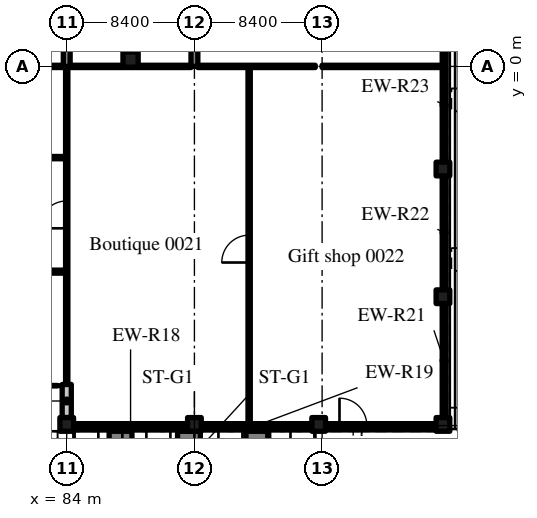
"""IFC4 building model, lengths in metres.
Left out: names, types, materials, properties, quantities, classifications, styles, units other than length and angle.
Written with IfcOpenShell. Run it as: python <this file> out.ifc"""

import sys

from ifc_helpers import new_model, si_unit, direction, frame, frame_2d, origin, origin_2d, place, context, subcontext, project, spatial, rectangle, extrude, source, transform, mapped, element, fill, save


model = new_model("IFC4")
c1 = context("Model", 3, precision=1e-05, world=origin(), true_north=direction((0.0, 1.0)))
c2 = subcontext(c1, "Body", "Model", "MODEL_VIEW")
j1 = project(units=[si_unit("LENGTHUNIT", "METRE"), si_unit("PLANEANGLEUNIT", "RADIAN")], contexts=[c1])
p1 = place(None, origin())
s1 = spatial("IfcSite", under=j1, at=p1, CompositionType="ELEMENT")
p2 = place(p1, origin())
s2 = spatial("IfcBuilding", under=s1, at=p2, CompositionType="ELEMENT")
p3 = place(p2, origin())
s3 = spatial("IfcBuildingStorey", under=s2, at=p3, CompositionType="ELEMENT", Elevation=0.0)
m1 = source(origin(), c2, "Body", "SweptSolid", [
    extrude(rectangle(XDim=19.6, YDim=0.45, at=frame_2d((9.8, 0.0))), origin(), (0.0, 0.0, 1.0), 5.72),
])
for number, where, z_axis, x_axis in (
    (1, (84.0, 0.0, 0.0), (0.0, 0.0, 1.0), (0.0, 1.0, 0.0)),
    (2, (92.4, 0.0, 0.0), (0.0, 0.0, 1.0), (0.0, 1.0, 0.0)),
):
    element("IfcWall", number, at=place(p3, frame(where, z_axis=z_axis, x_axis=x_axis)), inside=s3, PredefinedType="SHEAR", context=c2, shape_type="MappedRepresentation", body=[
        mapped(m1, transform((0.0, 0.0, 0.0), scale=1.0)),
    ])
m2 = source(origin(), c2, "Body", "SweptSolid", [
    extrude(rectangle(XDim=1.0, YDim=1.0, at=origin_2d()), origin(), (0.0, 0.0, 1.0), 5.72),
])
p4 = place(p3, frame((88.2, 0.45, 0.0), z_axis=(0.0, 0.0, 1.0), x_axis=(1.0, 0.0, 0.0)))
e3 = element("IfcColumn", 3, at=p4, inside=s3, PredefinedType="COLUMN", context=c2, shape_type="MappedRepresentation", body=[
    mapped(m2, transform((0.0, 0.0, 0.0), scale=1.0)),
])
m3 = source(origin(), c2, "Body", "SweptSolid", [
    extrude(rectangle(XDim=0.9, YDim=0.9, at=origin_2d()), origin(), (0.0, 0.0, 1.0), 5.72),
])
for number, where, z_axis, x_axis in (
    (4, (108.75, -23.55, 0.0), (0.0, 0.0, 1.0), (1.0, 0.0, 0.0)),
    (5, (108.75, -15.15, 0.0), (0.0, 0.0, 1.0), (1.0, 0.0, 0.0)),
    (6, (108.75, -6.75, 0.0), (0.0, 0.0, 1.0), (1.0, 0.0, 0.0)),
    (7, (84.0, -23.55, 0.0), (0.0, 0.0, 1.0), (1.0, 0.0, 0.0)),
    (8, (92.4, -23.55, 0.0), (0.0, 0.0, 1.0), (1.0, 0.0, 0.0)),
    (9, (100.575, -23.55, 0.0), (0.0, 0.0, 1.0), (1.0, 0.0, 0.0)),
):
    element("IfcColumn", number, at=place(p3, frame(where, z_axis=z_axis, x_axis=x_axis)), inside=s3, PredefinedType="COLUMN", context=c2, shape_type="MappedRepresentation", body=[
        mapped(m3, transform((0.0, 0.0, 0.0), scale=1.0)),
    ])
m4 = source(origin(), c2, "Body", "SweptSolid", [
    extrude(rectangle(XDim=7.5, YDim=0.25, at=frame_2d((3.75, 0.0))), origin(), (0.0, 0.0, 1.0), 4.65),
])
p5 = place(p3, frame((84.45, -23.625, 0.0), z_axis=(0.0, 0.0, 1.0), x_axis=(1.0, 0.0, 0.0)))
e10 = element("IfcWall", 10, at=p5, inside=s3, PredefinedType="SOLIDWALL", context=c2, shape_type="MappedRepresentation", body=[
    mapped(m4, transform((0.0, 0.0, 0.0), scale=1.0)),
])
m5 = source(origin(), c2, "Body", "SweptSolid", [
    extrude(rectangle(XDim=7.275, YDim=0.25, at=frame_2d((3.637, 0.0))), origin(), (0.0, 0.0, 1.0), 4.65),
])
p6 = place(p3, frame((92.85, -23.625, 0.0), z_axis=(0.0, 0.0, 1.0), x_axis=(1.0, 0.0, 0.0)))
e11 = element("IfcWall", 11, at=p6, inside=s3, PredefinedType="SOLIDWALL", context=c2, shape_type="MappedRepresentation", body=[
    mapped(m5, transform((0.0, 0.0, 0.0), scale=1.0)),
])
m6 = source(origin(), c2, "Body", "SweptSolid", [
    extrude(rectangle(XDim=7.275, YDim=0.25, at=frame_2d((3.638, 0.0))), origin(), (0.0, 0.0, 1.0), 4.65),
])
p7 = place(p3, frame((101.025, -23.625, 0.0), z_axis=(0.0, 0.0, 1.0), x_axis=(1.0, 0.0, 0.0)))
e12 = element("IfcWall", 12, at=p7, inside=s3, PredefinedType="SOLIDWALL", context=c2, shape_type="MappedRepresentation", body=[
    mapped(m6, transform((0.0, 0.0, 0.0), scale=1.0)),
])
m7 = source(origin(), c2, "Body", "SweptSolid", [
    extrude(rectangle(XDim=1.8, YDim=2.4, at=frame_2d((0.9, 1.2))), frame((0.0, 0.135, 0.0), z_axis=(0.0, -1.0, 0.0), x_axis=(1.0, 0.0, 0.0)), (0.0, 0.0, 1.0), 0.27),
])
p8 = place(p7, frame((0.919, 0.0, 0.0)))
e13 = element("IfcOpeningElement", 13, at=p8, cuts=e12, PredefinedType="OPENING", context=c2, shape_type="MappedRepresentation", body=[
    mapped(m7, transform((0.0, 0.0, 0.0), scale=1.0)),
])
m8 = source(origin(), c2, "Body", "SweptSolid", [
    extrude(rectangle(XDim=2.4, YDim=3.0, at=frame_2d((1.2, 1.5))), frame((0.0, 0.135, 0.0), z_axis=(0.0, -1.0, 0.0), x_axis=(1.0, 0.0, 0.0)), (0.0, 0.0, 1.0), 0.27),
])
p9 = place(p7, frame((4.256, 0.0, 0.2)))
e14 = element("IfcOpeningElement", 14, at=p9, cuts=e12, PredefinedType="OPENING", context=c2, shape_type="MappedRepresentation", body=[
    mapped(m8, transform((0.0, 0.0, 0.0), scale=1.0)),
])
m9 = source(origin(), c2, "Body", "SweptSolid", [
    extrude(rectangle(XDim=7.5, YDim=0.25, at=frame_2d((3.75, 0.0))), origin(), (0.0, 0.0, 1.0), 4.72),
])
for number, where, z_axis, x_axis in (
    (15, (108.825, -23.1, 0.0), (0.0, 0.0, 1.0), (0.0, 1.0, 0.0)),
    (16, (108.825, -14.7, 0.0), (0.0, 0.0, 1.0), (0.0, 1.0, 0.0)),
    (17, (108.825, -6.3, 0.0), (0.0, 0.0, 1.0), (0.0, 1.0, 0.0)),
):
    element("IfcWall", number, at=place(p3, frame(where, z_axis=z_axis, x_axis=x_axis)), inside=s3, PredefinedType="SOLIDWALL", context=c2, shape_type="MappedRepresentation", body=[
        mapped(m9, transform((0.0, 0.0, 0.0), scale=1.0)),
    ])
m10 = source(origin(), c2, "Body", "SweptSolid", [
    extrude(rectangle(XDim=2.18, YDim=0.6, at=frame_2d((1.09, 0.0))), origin(), (0.0, 0.0, 1.0), 4.05),
])
p10 = place(p3, frame((84.0, -23.1, 0.0), z_axis=(0.0, 0.0, 1.0), x_axis=(0.0, 1.0, 0.0)))
e18 = element("IfcWall", 18, at=p10, inside=s3, PredefinedType="SOLIDWALL", context=c2, shape_type="MappedRepresentation", body=[
    mapped(m10, transform((0.0, 0.0, 0.0), scale=1.0)),
])
m11 = source(origin(), c2, "Body", "SweptSolid", [
    extrude(rectangle(XDim=1.5, YDim=0.75, at=frame_2d((0.75, 0.0))), origin(), (0.0, 0.0, 1.0), 5.8),
])
for number, where, z_axis, x_axis in (
    (19, (86.79, -24.375, 0.0), (0.0, 0.0, 1.0), (1.0, 0.0, 0.0)),
    (20, (91.29, -24.375, 0.0), (0.0, 0.0, 1.0), (1.0, 0.0, 0.0)),
    (21, (95.79, -24.375, 0.0), (0.0, 0.0, 1.0), (1.0, 0.0, 0.0)),
):
    element("IfcWall", number, at=place(p3, frame(where, z_axis=z_axis, x_axis=x_axis)), inside=s3, PredefinedType="SOLIDWALL", context=c2, shape_type="MappedRepresentation", body=[
        mapped(m11, transform((0.0, 0.0, 0.0), scale=1.0)),
    ])
m12 = source(origin(), c2, "Body", "SweptSolid", [
    extrude(rectangle(XDim=7.95, YDim=0.15, at=frame_2d((3.975, 0.0))), origin(), (0.0, 0.0, 1.0), 5.72),
])
for number, where, z_axis, x_axis in (
    (22, (75.825, 0.0, 0.0), (0.0, 0.0, 1.0), (1.0, 0.0, 0.0)),
    (23, (84.225, 0.0, 0.0), (0.0, 0.0, 1.0), (1.0, 0.0, 0.0)),
):
    element("IfcWall", number, at=place(p3, frame(where, z_axis=z_axis, x_axis=x_axis)), inside=s3, PredefinedType="PARTITIONING", context=c2, shape_type="MappedRepresentation", body=[
        mapped(m12, transform((0.0, 0.0, 0.0), scale=1.0)),
    ])
m13 = source(origin(), c2, "Body", "SweptSolid", [
    extrude(rectangle(XDim=7.725, YDim=0.15, at=frame_2d((3.863, 0.0))), origin(), (0.0, 0.0, 1.0), 5.72),
])
p11 = place(p3, frame((92.625, 0.0, 0.0), z_axis=(0.0, 0.0, 1.0), x_axis=(1.0, 0.0, 0.0)))
e24 = element("IfcWall", 24, at=p11, inside=s3, PredefinedType="PARTITIONING", context=c2, shape_type="MappedRepresentation", body=[
    mapped(m13, transform((0.0, 0.0, 0.0), scale=1.0)),
])
m14 = source(origin(), c2, "Body", "SweptSolid", [
    extrude(rectangle(XDim=20.845, YDim=0.15, at=frame_2d((10.422, 0.0))), origin(), (0.0, 0.0, 1.0), 4.12),
])
p12 = place(p3, frame((84.0, -20.92, 0.0), z_axis=(0.0, 0.0, 1.0), x_axis=(0.0, 1.0, 0.0)))
e25 = element("IfcWall", 25, at=p12, inside=s3, PredefinedType="PARTITIONING", context=c2, shape_type="MappedRepresentation", body=[
    mapped(m14, transform((0.0, 0.0, 0.0), scale=1.0)),
])
m15 = source(origin(), c2, "Body", "SweptSolid", [
    extrude(rectangle(XDim=1.8, YDim=2.1, at=frame_2d((0.9, 1.05))), frame((0.0, 0.085, 0.0), z_axis=(0.0, -1.0, 0.0), x_axis=(1.0, 0.0, 0.0)), (0.0, 0.0, 1.0), 0.17),
])
p13 = place(p12, frame((10.27, 0.0, 0.0)))
e26 = element("IfcOpeningElement", 26, at=p13, cuts=e25, PredefinedType="OPENING", context=c2, shape_type="MappedRepresentation", body=[
    mapped(m15, transform((0.0, 0.0, 0.0), scale=1.0)),
])
m16 = source(origin(), c2, "Body", "SweptSolid", [
    extrude(rectangle(XDim=23.425, YDim=0.15, at=frame_2d((11.712, 0.0))), origin(), (0.0, 0.0, 1.0), 5.72),
])
p14 = place(p3, frame((96.0, -23.5, 0.0), z_axis=(0.0, 0.0, 1.0), x_axis=(0.0, 1.0, 0.0)))
e27 = element("IfcWall", 27, at=p14, inside=s3, PredefinedType="PARTITIONING", context=c2, shape_type="MappedRepresentation", body=[
    mapped(m16, transform((0.0, 0.0, 0.0), scale=1.0)),
])
p15 = place(p14, frame((10.6, 0.0, 0.0)))
e28 = element("IfcOpeningElement", 28, at=p15, cuts=e27, PredefinedType="OPENING", context=c2, shape_type="MappedRepresentation", body=[
    mapped(m15, transform((0.0, 0.0, 0.0), scale=1.0)),
])
m17 = source(origin(), c2, "Body", "SweptSolid", [
    extrude(rectangle(XDim=25.2, YDim=0.2, at=frame_2d((12.6, 0.0))), origin(), (0.0, 0.0, 1.0), 5.72),
])
p16 = place(p3, frame((58.8, -13.5, 0.0), z_axis=(0.0, 0.0, 1.0), x_axis=(1.0, 0.0, 0.0)))
e29 = element("IfcWall", 29, at=p16, inside=s3, PredefinedType="PARTITIONING", context=c2, shape_type="MappedRepresentation", body=[
    mapped(m17, transform((0.0, 0.0, 0.0), scale=1.0)),
])
m18 = source(origin(), c2, "Body", "SweptSolid", [
    extrude(rectangle(XDim=2.4, YDim=2.1, at=frame_2d((1.2, 1.05))), frame((0.0, 0.11, 0.0), z_axis=(0.0, -1.0, 0.0), x_axis=(1.0, 0.0, 0.0)), (0.0, 0.0, 1.0), 0.22),
])
p17 = place(p16, frame((1.6, 0.0, 0.0)))
e30 = element("IfcOpeningElement", 30, at=p17, cuts=e29, PredefinedType="OPENING", context=c2, shape_type="MappedRepresentation", body=[
    mapped(m18, transform((0.0, 0.0, 0.0), scale=1.0)),
])
p18 = place(p16, frame((6.6, 0.0, 0.0)))
e31 = element("IfcOpeningElement", 31, at=p18, cuts=e29, PredefinedType="OPENING", context=c2, shape_type="MappedRepresentation", body=[
    mapped(m18, transform((0.0, 0.0, 0.0), scale=1.0)),
])
p19 = place(p16, frame((11.6, 0.0, 0.0)))
e32 = element("IfcOpeningElement", 32, at=p19, cuts=e29, PredefinedType="OPENING", context=c2, shape_type="MappedRepresentation", body=[
    mapped(m18, transform((0.0, 0.0, 0.0), scale=1.0)),
])
p20 = place(p16, frame((16.6, 0.0, 0.0)))
e33 = element("IfcOpeningElement", 33, at=p20, cuts=e29, PredefinedType="OPENING", context=c2, shape_type="MappedRepresentation", body=[
    mapped(m18, transform((0.0, 0.0, 0.0), scale=1.0)),
])
p21 = place(p16, frame((21.6, 0.0, 0.0)))
e34 = element("IfcOpeningElement", 34, at=p21, cuts=e29, PredefinedType="OPENING", context=c2, shape_type="MappedRepresentation", body=[
    mapped(m18, transform((0.0, 0.0, 0.0), scale=1.0)),
])
m19 = source(origin(), c2, "Body", "SweptSolid", [
    extrude(rectangle(XDim=33.6, YDim=0.15, at=frame_2d((16.8, 0.0))), origin(), (0.0, 0.0, 1.0), 5.72),
])
p22 = place(p3, frame((50.4, -6.0, 0.0), z_axis=(0.0, 0.0, 1.0), x_axis=(1.0, 0.0, 0.0)))
e35 = element("IfcWall", 35, at=p22, inside=s3, PredefinedType="PARTITIONING", context=c2, shape_type="MappedRepresentation", body=[
    mapped(m19, transform((0.0, 0.0, 0.0), scale=1.0)),
])
m20 = source(origin(), c2, "Body", "SweptSolid", [
    extrude(rectangle(XDim=1.0, YDim=2.1, at=frame_2d((0.5, 1.05))), frame((0.0, 0.085, 0.0), z_axis=(0.0, -1.0, 0.0), x_axis=(1.0, 0.0, 0.0)), (0.0, 0.0, 1.0), 0.17),
])
p23 = place(p22, frame((3.1, 0.0, 0.0)))
e36 = element("IfcOpeningElement", 36, at=p23, cuts=e35, PredefinedType="OPENING", context=c2, shape_type="MappedRepresentation", body=[
    mapped(m20, transform((0.0, 0.0, 0.0), scale=1.0)),
])
p24 = place(p22, frame((10.9, 0.0, 0.0)))
e37 = element("IfcOpeningElement", 37, at=p24, cuts=e35, PredefinedType="OPENING", context=c2, shape_type="MappedRepresentation", body=[
    mapped(m20, transform((0.0, 0.0, 0.0), scale=1.0)),
])
p25 = place(p22, frame((18.1, 0.0, 0.0)))
e38 = element("IfcOpeningElement", 38, at=p25, cuts=e35, PredefinedType="OPENING", context=c2, shape_type="MappedRepresentation", body=[
    mapped(m20, transform((0.0, 0.0, 0.0), scale=1.0)),
])
p26 = place(p22, frame((27.1, 0.0, 0.0)))
e39 = element("IfcOpeningElement", 39, at=p26, cuts=e35, PredefinedType="OPENING", context=c2, shape_type="MappedRepresentation", body=[
    mapped(m20, transform((0.0, 0.0, 0.0), scale=1.0)),
])
m21 = source(origin(), c2, "Body", "SweptSolid", [
    extrude(rectangle(XDim=7.9, YDim=0.15, at=frame_2d((3.95, 0.0))), origin(), (0.0, 0.0, 1.0), 5.72),
])
p27 = place(p3, frame((100.8, 0.0, 0.0), z_axis=(0.0, 0.0, 1.0), x_axis=(1.0, 0.0, 0.0)))
e40 = element("IfcWall", 40, at=p27, inside=s3, PredefinedType="PARTITIONING", context=c2, shape_type="MappedRepresentation", body=[
    mapped(m21, transform((0.0, 0.0, 0.0), scale=1.0)),
])
m22 = source(origin(), c2, "Body", "SweptSolid", [
    extrude(rectangle(XDim=1.8, YDim=2.4, at=frame_2d((0.9, 1.2))), frame((0.0, 0.025, 0.0), z_axis=(0.0, -1.0, 0.0), x_axis=(1.0, 0.0, 0.0)), (0.0, 0.0, 1.0), 0.05),
])
p28 = place(p8, origin())
e41 = element("IfcDoor", 41, at=p28, inside=s3, OperationType="DOUBLE_DOOR_SINGLE_SWING", PredefinedType="DOOR", context=c2, shape_type="MappedRepresentation", body=[
    mapped(m22, transform((0.0, 0.0, 0.0), scale=1.0)),
])
fill(e13, e41)
m23 = source(origin(), c2, "Body", "SweptSolid", [
    extrude(rectangle(XDim=2.4, YDim=3.0, at=frame_2d((1.2, 1.5))), frame((0.0, 0.03, 0.0), z_axis=(0.0, -1.0, 0.0), x_axis=(1.0, 0.0, 0.0)), (0.0, 0.0, 1.0), 0.06),
])
p29 = place(p9, origin())
e42 = element("IfcWindow", 42, at=p29, inside=s3, PartitioningType="SINGLE_PANEL", PredefinedType="WINDOW", context=c2, shape_type="MappedRepresentation", body=[
    mapped(m23, transform((0.0, 0.0, 0.0), scale=1.0)),
])
fill(e14, e42)
m24 = source(origin(), c2, "Body", "SweptSolid", [
    extrude(rectangle(XDim=1.8, YDim=2.1, at=frame_2d((0.9, 1.05))), frame((0.0, 0.025, 0.0), z_axis=(0.0, -1.0, 0.0), x_axis=(1.0, 0.0, 0.0)), (0.0, 0.0, 1.0), 0.05),
])
p30 = place(p13, origin())
e43 = element("IfcDoor", 43, at=p30, inside=s3, OperationType="DOUBLE_DOOR_SINGLE_SWING", PredefinedType="DOOR", context=c2, shape_type="MappedRepresentation", body=[
    mapped(m24, transform((0.0, 0.0, 0.0), scale=1.0)),
])
fill(e26, e43)
p31 = place(p15, origin())
e44 = element("IfcDoor", 44, at=p31, inside=s3, OperationType="DOUBLE_DOOR_SINGLE_SWING", PredefinedType="DOOR", context=c2, shape_type="MappedRepresentation", body=[
    mapped(m24, transform((0.0, 0.0, 0.0), scale=1.0)),
])
fill(e28, e44)
save(model, sys.argv[1])
